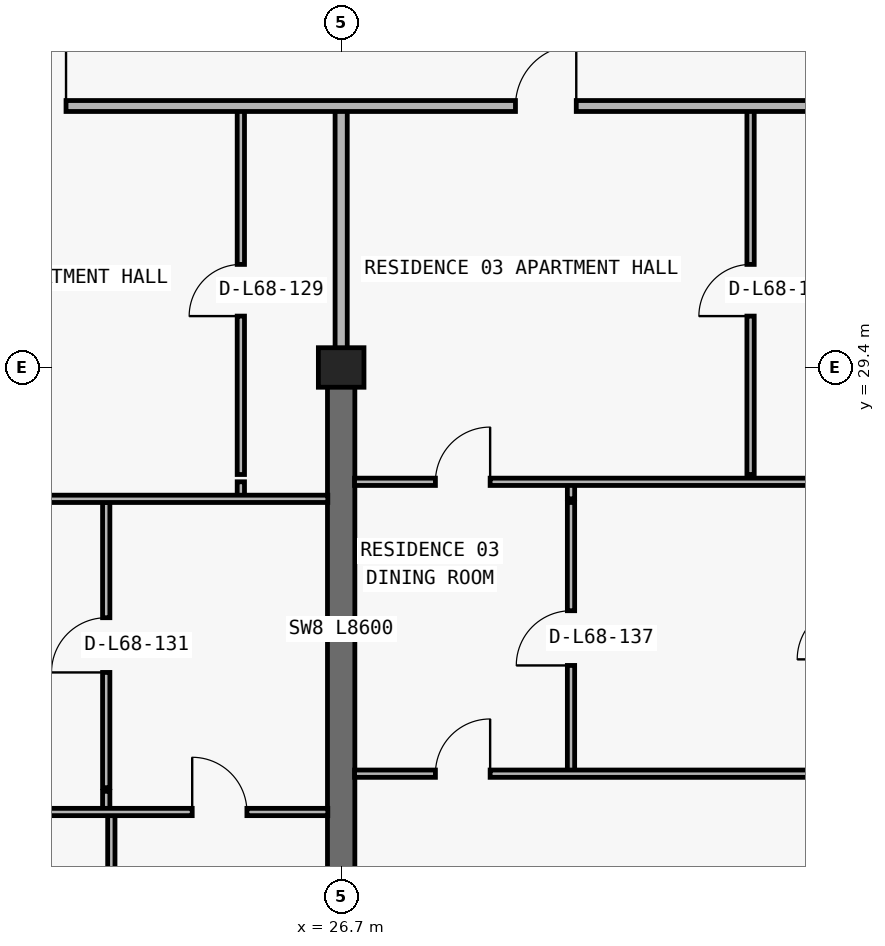
"""IFC4 building model, lengths in metres.
Left out: names, types, materials, properties, quantities, classifications, styles, units other than length and angle.
Written with IfcOpenShell. Run it as: python <this file> out.ifc"""

import sys

from ifc_helpers import new_model, si_unit, direction, frame, frame_2d, origin, origin_2d, place, context, subcontext, project, spatial, rectangle, extrude, element, fill, save


model = new_model("IFC4")
c1 = context("Model", 3, precision=1e-05, world=origin(), true_north=direction((0.0, 1.0)))
c2 = subcontext(c1, "Body", "Model", "MODEL_VIEW")
j1 = project(units=[si_unit("LENGTHUNIT", "METRE"), si_unit("PLANEANGLEUNIT", "RADIAN")], contexts=[c1])
p1 = place(None, origin())
s1 = spatial("IfcSite", under=j1, at=p1, CompositionType="ELEMENT")
p2 = place(p1, origin())
s2 = spatial("IfcBuilding", under=s1, at=p2, CompositionType="ELEMENT")
p3 = place(p2, frame((0.0, 0.0, 243.0)))
s3 = spatial("IfcBuildingStorey", under=s2, at=p3, CompositionType="ELEMENT", Elevation=243.0)
p4 = place(p3, frame((26.7, 29.4, 0.0), z_axis=(0.0, 0.0, 1.0), x_axis=(1.0, 0.0, 0.0)))
e1 = element("IfcColumn", 1, at=p4, inside=s3, PredefinedType="COLUMN", context=c2, shape_type="SweptSolid", body=[
    extrude(rectangle(XDim=0.75, YDim=0.65, at=origin_2d()), origin(), (0.0, 0.0, 1.0), 3.05),
])
p5 = place(p3, frame((26.7, 20.8, 0.0), z_axis=(0.0, 0.0, 1.0), x_axis=(0.0, 1.0, 0.0)))
e2 = element("IfcWall", 2, at=p5, inside=s3, PredefinedType="SHEAR", context=c2, shape_type="SweptSolid", body=[
    extrude(rectangle(XDim=8.6, YDim=0.45, at=frame_2d((4.3, 0.0))), origin(), (0.0, 0.0, 1.0), 3.05),
])
p6 = place(p3, frame((22.836, 22.09, 0.0), z_axis=(0.0, 0.0, 1.0), x_axis=(0.0, 1.0, 0.0)))
e3 = element("IfcWall", 3, at=p6, inside=s3, PredefinedType="PARTITIONING", context=c2, shape_type="SweptSolid", body=[
    extrude(rectangle(XDim=0.34, YDim=0.12, at=frame_2d((0.17, 0.0))), origin(), (0.0, 0.0, 1.0), 3.05),
])
p7 = place(p3, frame((22.836, 22.49, 0.0), z_axis=(0.0, 0.0, 1.0), x_axis=(0.0, 1.0, 0.0)))
e4 = element("IfcWall", 4, at=p7, inside=s3, PredefinedType="PARTITIONING", context=c2, shape_type="SweptSolid", body=[
    extrude(rectangle(XDim=4.69, YDim=0.12, at=frame_2d((2.345, 0.0))), origin(), (0.0, 0.0, 1.0), 3.05),
])
p8 = place(p7, frame((1.895, 0.0, 0.0)))
e5 = element("IfcOpeningElement", 5, at=p8, cuts=e4, PredefinedType="OPENING", context=c2, shape_type="SweptSolid", body=[
    extrude(rectangle(XDim=0.9, YDim=2.15, at=frame_2d((0.45, 1.075))), frame((0.0, 0.07, 0.0), z_axis=(0.0, -1.0, 0.0), x_axis=(1.0, 0.0, 0.0)), (0.0, 0.0, 1.0), 0.14),
])
p9 = place(p3, frame((22.92, 13.34, 0.0), z_axis=(0.0, 0.0, 1.0), x_axis=(0.0, 1.0, 0.0)))
e6 = element("IfcWall", 6, at=p9, inside=s3, PredefinedType="PARTITIONING", context=c2, shape_type="SweptSolid", body=[
    extrude(rectangle(XDim=8.69, YDim=0.12, at=frame_2d((4.345, 0.0))), origin(), (0.0, 0.0, 1.0), 3.05),
])
p10 = place(p3, frame((25.05, 27.24, 0.0), z_axis=(0.0, 0.0, 1.0), x_axis=(0.0, 1.0, 0.0)))
e7 = element("IfcWall", 7, at=p10, inside=s3, PredefinedType="PARTITIONING", context=c2, shape_type="SweptSolid", body=[
    extrude(rectangle(XDim=0.28, YDim=0.12, at=frame_2d((0.14, 0.0))), origin(), (0.0, 0.0, 1.0), 3.05),
])
p11 = place(p3, frame((25.05, 27.64, 0.0), z_axis=(0.0, 0.0, 1.0), x_axis=(0.0, 1.0, 0.0)))
e8 = element("IfcWall", 8, at=p11, inside=s3, PredefinedType="PARTITIONING", context=c2, shape_type="SweptSolid", body=[
    extrude(rectangle(XDim=6.06, YDim=0.12, at=frame_2d((3.03, 0.0))), origin(), (0.0, 0.0, 1.0), 3.05),
])
p12 = place(p11, frame((2.605, 0.0, 0.0)))
e9 = element("IfcOpeningElement", 9, at=p12, cuts=e8, PredefinedType="OPENING", context=c2, shape_type="SweptSolid", body=[
    extrude(rectangle(XDim=0.85, YDim=2.1, at=frame_2d((0.425, 1.05))), frame((0.0, 0.07, 0.0), z_axis=(0.0, -1.0, 0.0), x_axis=(1.0, 0.0, 0.0)), (0.0, 0.0, 1.0), 0.14),
])
p13 = place(p3, frame((26.7, 29.405, 0.0), z_axis=(0.0, 0.0, 1.0), x_axis=(0.0, 1.0, 0.0)))
e10 = element("IfcWall", 10, at=p13, inside=s3, PredefinedType="PARTITIONING", context=c2, shape_type="SweptSolid", body=[
    extrude(rectangle(XDim=4.295, YDim=0.2, at=frame_2d((2.147, 0.0))), origin(), (0.0, 0.0, 1.0), 2.335),
])
p14 = place(p3, frame((30.48, 22.72, 0.0), z_axis=(0.0, 0.0, 1.0), x_axis=(0.0, 1.0, 0.0)))
e11 = element("IfcWall", 11, at=p14, inside=s3, PredefinedType="PARTITIONING", context=c2, shape_type="SweptSolid", body=[
    extrude(rectangle(XDim=4.46, YDim=0.12, at=frame_2d((2.23, 0.0))), origin(), (0.0, 0.0, 1.0), 3.05),
])
p15 = place(p14, frame((1.78, 0.0, 0.0)))
e12 = element("IfcOpeningElement", 12, at=p15, cuts=e11, PredefinedType="OPENING", context=c2, shape_type="SweptSolid", body=[
    extrude(rectangle(XDim=0.9, YDim=2.15, at=frame_2d((0.45, 1.075))), frame((0.0, 0.07, 0.0), z_axis=(0.0, -1.0, 0.0), x_axis=(1.0, 0.0, 0.0)), (0.0, 0.0, 1.0), 0.14),
])
p16 = place(p3, frame((30.48, 27.24, 0.0), z_axis=(0.0, 0.0, 1.0), x_axis=(0.0, 1.0, 0.0)))
e13 = element("IfcWall", 13, at=p16, inside=s3, PredefinedType="PARTITIONING", context=c2, shape_type="SweptSolid", body=[
    extrude(rectangle(XDim=0.28, YDim=0.12, at=frame_2d((0.14, 0.0))), origin(), (0.0, 0.0, 1.0), 3.05),
])
p17 = place(p3, frame((33.433, 27.64, 0.0), z_axis=(0.0, 0.0, 1.0), x_axis=(0.0, 1.0, 0.0)))
e14 = element("IfcWall", 14, at=p17, inside=s3, PredefinedType="PARTITIONING", context=c2, shape_type="SweptSolid", body=[
    extrude(rectangle(XDim=6.06, YDim=0.12, at=frame_2d((3.03, 0.0))), origin(), (0.0, 0.0, 1.0), 3.05),
])
p18 = place(p17, frame((2.605, 0.0, 0.0)))
e15 = element("IfcOpeningElement", 15, at=p18, cuts=e14, PredefinedType="OPENING", context=c2, shape_type="SweptSolid", body=[
    extrude(rectangle(XDim=0.85, YDim=2.1, at=frame_2d((0.425, 1.05))), frame((0.0, 0.07, 0.0), z_axis=(0.0, -1.0, 0.0), x_axis=(1.0, 0.0, 0.0)), (0.0, 0.0, 1.0), 0.14),
])
p19 = place(p3, frame((18.3, 22.09, 0.0), z_axis=(0.0, 0.0, 1.0), x_axis=(1.0, 0.0, 0.0)))
e16 = element("IfcWall", 16, at=p19, inside=s3, PredefinedType="PARTITIONING", context=c2, shape_type="SweptSolid", body=[
    extrude(rectangle(XDim=8.18, YDim=0.12, at=frame_2d((4.09, 0.0))), origin(), (0.0, 0.0, 1.0), 3.05),
])
p20 = place(p19, frame((1.818, 0.0, 0.0)))
e17 = element("IfcOpeningElement", 17, at=p20, cuts=e16, PredefinedType="OPENING", context=c2, shape_type="SweptSolid", body=[
    extrude(rectangle(XDim=0.9, YDim=2.15, at=frame_2d((0.45, 1.075))), frame((0.0, 0.07, 0.0), z_axis=(0.0, -1.0, 0.0), x_axis=(1.0, 0.0, 0.0)), (0.0, 0.0, 1.0), 0.14),
])
p21 = place(p19, frame((5.95, 0.0, 0.0)))
e18 = element("IfcOpeningElement", 18, at=p21, cuts=e16, PredefinedType="OPENING", context=c2, shape_type="SweptSolid", body=[
    extrude(rectangle(XDim=0.9, YDim=2.15, at=frame_2d((0.45, 1.075))), frame((0.0, 0.07, 0.0), z_axis=(0.0, -1.0, 0.0), x_axis=(1.0, 0.0, 0.0)), (0.0, 0.0, 1.0), 0.14),
])
p22 = place(p3, frame((26.92, 22.72, 0.0), z_axis=(0.0, 0.0, 1.0), x_axis=(1.0, 0.0, 0.0)))
e19 = element("IfcWall", 19, at=p22, inside=s3, PredefinedType="PARTITIONING", context=c2, shape_type="SweptSolid", body=[
    extrude(rectangle(XDim=8.18, YDim=0.12, at=frame_2d((4.09, 0.0))), origin(), (0.0, 0.0, 1.0), 3.05),
])
p23 = place(p22, frame((1.33, 0.0, 0.0)))
e20 = element("IfcOpeningElement", 20, at=p23, cuts=e19, PredefinedType="OPENING", context=c2, shape_type="SweptSolid", body=[
    extrude(rectangle(XDim=0.9, YDim=2.15, at=frame_2d((0.45, 1.075))), frame((0.0, 0.07, 0.0), z_axis=(0.0, -1.0, 0.0), x_axis=(1.0, 0.0, 0.0)), (0.0, 0.0, 1.0), 0.14),
])
p24 = place(p3, frame((18.3, 27.24, 0.0), z_axis=(0.0, 0.0, 1.0), x_axis=(1.0, 0.0, 0.0)))
e21 = element("IfcWall", 21, at=p24, inside=s3, PredefinedType="PARTITIONING", context=c2, shape_type="SweptSolid", body=[
    extrude(rectangle(XDim=8.18, YDim=0.12, at=frame_2d((4.09, 0.0))), origin(), (0.0, 0.0, 1.0), 3.05),
])
p25 = place(p24, frame((1.818, 0.0, 0.0)))
e22 = element("IfcOpeningElement", 22, at=p25, cuts=e21, PredefinedType="OPENING", context=c2, shape_type="SweptSolid", body=[
    extrude(rectangle(XDim=0.9, YDim=2.15, at=frame_2d((0.45, 1.075))), frame((0.0, 0.07, 0.0), z_axis=(0.0, -1.0, 0.0), x_axis=(1.0, 0.0, 0.0)), (0.0, 0.0, 1.0), 0.14),
])
p26 = place(p3, frame((26.92, 27.52, 0.0), z_axis=(0.0, 0.0, 1.0), x_axis=(1.0, 0.0, 0.0)))
e23 = element("IfcWall", 23, at=p26, inside=s3, PredefinedType="PARTITIONING", context=c2, shape_type="SweptSolid", body=[
    extrude(rectangle(XDim=8.175, YDim=0.12, at=frame_2d((4.087, 0.0))), origin(), (0.0, 0.0, 1.0), 3.05),
])
p27 = place(p26, frame((1.33, 0.0, 0.0)))
e24 = element("IfcOpeningElement", 24, at=p27, cuts=e23, PredefinedType="OPENING", context=c2, shape_type="SweptSolid", body=[
    extrude(rectangle(XDim=0.9, YDim=2.15, at=frame_2d((0.45, 1.075))), frame((0.0, 0.07, 0.0), z_axis=(0.0, -1.0, 0.0), x_axis=(1.0, 0.0, 0.0)), (0.0, 0.0, 1.0), 0.14),
])
p28 = place(p3, frame((15.203, 33.7, 0.0), z_axis=(0.0, 0.0, 1.0), x_axis=(1.0, 0.0, 0.0)))
e25 = element("IfcWall", 25, at=p28, inside=s3, PredefinedType="PARTITIONING", context=c2, shape_type="SweptSolid", body=[
    extrude(rectangle(XDim=25.992, YDim=0.18, at=frame_2d((12.996, 0.0))), origin(), (0.0, 0.0, 1.0), 3.05),
])
p29 = place(p28, frame((5.972, 0.0, 0.0)))
e26 = element("IfcOpeningElement", 26, at=p29, cuts=e25, PredefinedType="OPENING", context=c2, shape_type="SweptSolid", body=[
    extrude(rectangle(XDim=1.0, YDim=2.2, at=frame_2d((0.5, 1.1))), frame((0.0, 0.1, 0.0), z_axis=(0.0, -1.0, 0.0), x_axis=(1.0, 0.0, 0.0)), (0.0, 0.0, 1.0), 0.2),
])
p30 = place(p28, frame((14.364, 0.0, 0.0)))
e27 = element("IfcOpeningElement", 27, at=p30, cuts=e25, PredefinedType="OPENING", context=c2, shape_type="SweptSolid", body=[
    extrude(rectangle(XDim=1.0, YDim=2.2, at=frame_2d((0.5, 1.1))), frame((0.0, 0.1, 0.0), z_axis=(0.0, -1.0, 0.0), x_axis=(1.0, 0.0, 0.0)), (0.0, 0.0, 1.0), 0.2),
])
p31 = place(p29, origin())
e28 = element("IfcDoor", 28, at=p31, inside=s3, OperationType="SINGLE_SWING_RIGHT", PredefinedType="DOOR", context=c2, shape_type="SweptSolid", body=[
    extrude(rectangle(XDim=1.0, YDim=2.2, at=frame_2d((0.5, 1.1))), frame((0.0, 0.025, 0.0), z_axis=(0.0, -1.0, 0.0), x_axis=(1.0, 0.0, 0.0)), (0.0, 0.0, 1.0), 0.05),
])
fill(e26, e28)
p32 = place(p12, origin())
e29 = element("IfcDoor", 29, at=p32, inside=s3, OperationType="SINGLE_SWING_LEFT", PredefinedType="DOOR", context=c2, shape_type="SweptSolid", body=[
    extrude(rectangle(XDim=0.85, YDim=2.1, at=frame_2d((0.425, 1.05))), frame((0.0, 0.025, 0.0), z_axis=(0.0, -1.0, 0.0), x_axis=(1.0, 0.0, 0.0)), (0.0, 0.0, 1.0), 0.05),
])
fill(e9, e29)
p33 = place(p8, origin())
e30 = element("IfcDoor", 30, at=p33, inside=s3, OperationType="SINGLE_SWING_LEFT", PredefinedType="DOOR", context=c2, shape_type="SweptSolid", body=[
    extrude(rectangle(XDim=0.9, YDim=2.15, at=frame_2d((0.45, 1.075))), frame((0.0, 0.025, 0.0), z_axis=(0.0, -1.0, 0.0), x_axis=(1.0, 0.0, 0.0)), (0.0, 0.0, 1.0), 0.05),
])
fill(e5, e30)
p34 = place(p21, origin())
e31 = element("IfcDoor", 31, at=p34, inside=s3, OperationType="SINGLE_SWING_LEFT", PredefinedType="DOOR", context=c2, shape_type="SweptSolid", body=[
    extrude(rectangle(XDim=0.9, YDim=2.15, at=frame_2d((0.45, 1.075))), frame((0.0, 0.025, 0.0), z_axis=(0.0, -1.0, 0.0), x_axis=(1.0, 0.0, 0.0)), (0.0, 0.0, 1.0), 0.05),
])
fill(e18, e31)
p35 = place(p30, origin())
e32 = element("IfcDoor", 32, at=p35, inside=s3, OperationType="SINGLE_SWING_RIGHT", PredefinedType="DOOR", context=c2, shape_type="SweptSolid", body=[
    extrude(rectangle(XDim=1.0, YDim=2.2, at=frame_2d((0.5, 1.1))), frame((0.0, 0.025, 0.0), z_axis=(0.0, -1.0, 0.0), x_axis=(1.0, 0.0, 0.0)), (0.0, 0.0, 1.0), 0.05),
])
fill(e27, e32)
p36 = place(p18, origin())
e33 = element("IfcDoor", 33, at=p36, inside=s3, OperationType="SINGLE_SWING_LEFT", PredefinedType="DOOR", context=c2, shape_type="SweptSolid", body=[
    extrude(rectangle(XDim=0.85, YDim=2.1, at=frame_2d((0.425, 1.05))), frame((0.0, 0.025, 0.0), z_axis=(0.0, -1.0, 0.0), x_axis=(1.0, 0.0, 0.0)), (0.0, 0.0, 1.0), 0.05),
])
fill(e15, e33)
p37 = place(p27, origin())
e34 = element("IfcDoor", 34, at=p37, inside=s3, OperationType="SINGLE_SWING_RIGHT", PredefinedType="DOOR", context=c2, shape_type="SweptSolid", body=[
    extrude(rectangle(XDim=0.9, YDim=2.15, at=frame_2d((0.45, 1.075))), frame((0.0, 0.025, 0.0), z_axis=(0.0, -1.0, 0.0), x_axis=(1.0, 0.0, 0.0)), (0.0, 0.0, 1.0), 0.05),
])
fill(e24, e34)
p38 = place(p15, origin())
e35 = element("IfcDoor", 35, at=p38, inside=s3, OperationType="SINGLE_SWING_LEFT", PredefinedType="DOOR", context=c2, shape_type="SweptSolid", body=[
    extrude(rectangle(XDim=0.9, YDim=2.15, at=frame_2d((0.45, 1.075))), frame((0.0, 0.025, 0.0), z_axis=(0.0, -1.0, 0.0), x_axis=(1.0, 0.0, 0.0)), (0.0, 0.0, 1.0), 0.05),
])
fill(e12, e35)
p39 = place(p23, origin())
e36 = element("IfcDoor", 36, at=p39, inside=s3, OperationType="SINGLE_SWING_RIGHT", PredefinedType="DOOR", context=c2, shape_type="SweptSolid", body=[
    extrude(rectangle(XDim=0.9, YDim=2.15, at=frame_2d((0.45, 1.075))), frame((0.0, 0.025, 0.0), z_axis=(0.0, -1.0, 0.0), x_axis=(1.0, 0.0, 0.0)), (0.0, 0.0, 1.0), 0.05),
])
fill(e20, e36)
save(model, sys.argv[1])
